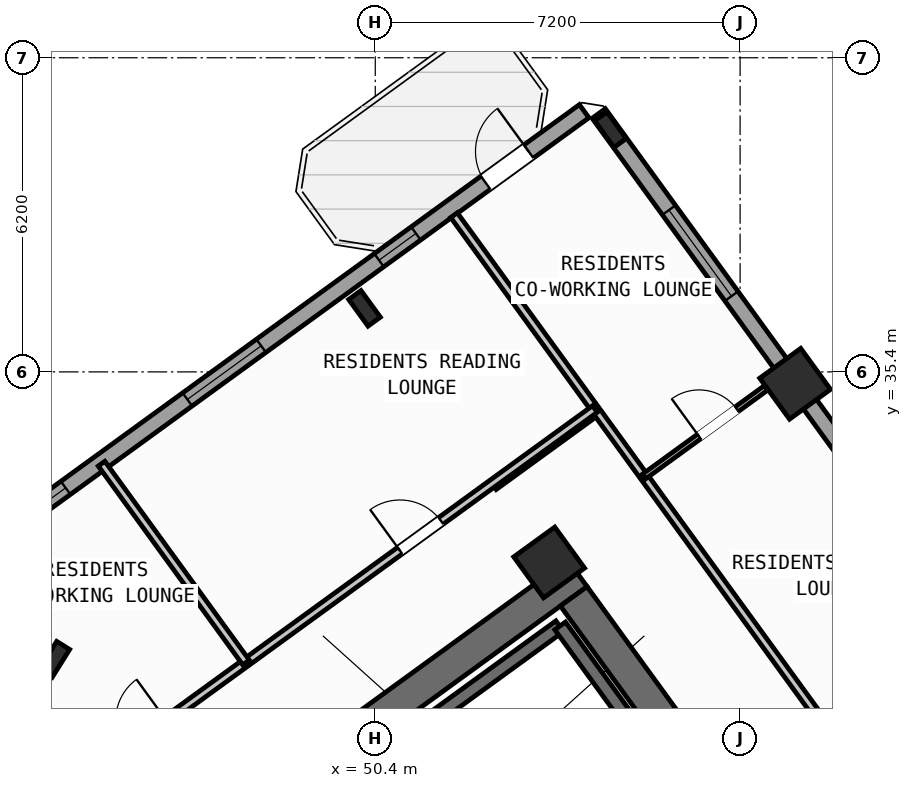
"""IFC4 building model, lengths in metres.
Left out: names, types, materials, properties, quantities, classifications, styles, units other than length and angle.
Written with IfcOpenShell. Run it as: python <this file> out.ifc"""

import sys

from ifc_helpers import new_model, si_unit, direction, frame, frame_2d, origin, origin_2d, place, context, subcontext, project, spatial, rectangle, hollow_rectangle, i_section, extrude, source, transform, mapped, element, fill, save


model = new_model("IFC4")
c1 = context("Model", 3, precision=1e-05, world=origin(), true_north=direction((0.0, 1.0)))
c2 = subcontext(c1, "Body", "Model", "MODEL_VIEW")
j1 = project(units=[si_unit("LENGTHUNIT", "METRE"), si_unit("PLANEANGLEUNIT", "RADIAN")], contexts=[c1])
p1 = place(None, origin())
s1 = spatial("IfcSite", under=j1, at=p1, CompositionType="ELEMENT")
p2 = place(p1, origin())
s2 = spatial("IfcBuilding", under=s1, at=p2, CompositionType="ELEMENT")
p3 = place(p2, frame((0.0, 0.0, 81.0)))
s3 = spatial("IfcBuildingStorey", under=s2, at=p3, CompositionType="ELEMENT", Elevation=81.0)
p4 = place(p3, frame((44.325, 24.113, 0.0), z_axis=(0.0, 0.0, 1.0), x_axis=(0.809012664862, 0.58779121131, 0.0)))
e1 = element("IfcWall", 1, at=p4, inside=s3, PredefinedType="SHEAR", context=c2, shape_type="SweptSolid", body=[
    extrude(rectangle(XDim=12.44, YDim=0.65, at=frame_2d((6.22, 0.0))), origin(), (0.0, 0.0, 1.0), 3.32),
])
p5 = place(p3, frame((58.064, 25.813, 0.0), z_axis=(0.0, 0.0, 1.0), x_axis=(-0.58777996584, 0.809020835181, 0.0)))
e2 = element("IfcWall", 2, at=p5, inside=s3, PredefinedType="SHEAR", context=c2, shape_type="SweptSolid", body=[
    extrude(rectangle(XDim=6.375, YDim=0.65, at=frame_2d((3.188, 0.0))), origin(), (0.0, 0.0, 1.0), 3.32),
])
m1 = source(origin(), c2, "Body", "SweptSolid", [
    extrude(i_section(OverallWidth=0.3, OverallDepth=0.65, WebThickness=0.016, FlangeThickness=0.031, at=origin_2d()), origin(), (0.0, 0.0, 1.0), 3.6),
])
p6 = place(p3, frame((44.068, 29.726, 0.0), z_axis=(0.0, 0.0, 1.0), x_axis=(-0.848048096156, 0.529919264233, 0.0)))
e3 = element("IfcColumn", 3, at=p6, inside=s3, PredefinedType="COLUMN", context=c2, shape_type="MappedRepresentation", body=[
    mapped(m1, transform((0.0, 0.0, 0.0), scale=1.0)),
])
m2 = source(origin(), c2, "Body", "SweptSolid", [
    extrude(hollow_rectangle(XDim=1.0, YDim=1.0, WallThickness=0.04, at=origin_2d()), origin(), (0.0, 0.0, 1.0), 3.6),
])
p7 = place(p3, frame((53.832, 31.638, 0.0), z_axis=(0.0, 0.0, 1.0), x_axis=(0.809016994375, 0.587785252292, 0.0)))
e4 = element("IfcColumn", 4, at=p7, inside=s3, PredefinedType="COLUMN", context=c2, shape_type="MappedRepresentation", body=[
    mapped(m2, transform((0.0, 0.0, 0.0), scale=1.0)),
])
p8 = place(p3, frame((50.188, 36.654, 0.0), z_axis=(0.0, 0.0, 1.0), x_axis=(0.809016994375, 0.587785252292, 0.0)))
e5 = element("IfcColumn", 5, at=p8, inside=s3, PredefinedType="COLUMN", context=c2, shape_type="MappedRepresentation", body=[
    mapped(m1, transform((0.0, 0.0, 0.0), scale=1.0)),
])
p9 = place(p3, frame((58.686, 35.165, 0.0), z_axis=(0.0, 0.0, 1.0), x_axis=(0.809016994375, 0.587785252292, 0.0)))
e6 = element("IfcColumn", 6, at=p9, inside=s3, PredefinedType="COLUMN", context=c2, shape_type="MappedRepresentation", body=[
    mapped(m2, transform((0.0, 0.0, 0.0), scale=1.0)),
])
p10 = place(p3, frame((55.042, 40.181, 0.0), z_axis=(0.0, 0.0, 1.0), x_axis=(0.809016994375, 0.587785252292, 0.0)))
e7 = element("IfcColumn", 7, at=p10, inside=s3, PredefinedType="COLUMN", context=c2, shape_type="MappedRepresentation", body=[
    mapped(m1, transform((0.0, 0.0, 0.0), scale=1.0)),
])
p11 = place(p3, frame((42.207, 31.597, 0.0), z_axis=(0.0, 0.0, 1.0), x_axis=(0.809020333377, 0.587780656523, 0.0)))
e8 = element("IfcWall", 8, at=p11, inside=s3, PredefinedType="STANDARD", context=c2, shape_type="SweptSolid", body=[
    extrude(rectangle(XDim=15.223, YDim=0.32, at=frame_2d((7.611, 0.0))), origin(), (0.0, 0.0, 1.0), 3.32),
])
p12 = place(p11, frame((12.82, 0.0, 0.0)))
e9 = element("IfcOpeningElement", 9, at=p12, cuts=e8, PredefinedType="OPENING", context=c2, shape_type="SweptSolid", body=[
    extrude(rectangle(XDim=1.05, YDim=2.15, at=frame_2d((0.525, 1.075))), frame((0.0, 0.17, 0.0), z_axis=(0.0, -1.0, 0.0), x_axis=(1.0, 0.0, 0.0)), (0.0, 0.0, 1.0), 0.34),
])
p13 = place(p11, frame((0.775, 0.0, 0.85)))
e10 = element("IfcOpeningElement", 10, at=p13, cuts=e8, PredefinedType="OPENING", context=c2, shape_type="SweptSolid", body=[
    extrude(rectangle(XDim=1.8, YDim=1.5, at=frame_2d((0.9, 0.75))), frame((0.0, 0.17, 0.0), z_axis=(0.0, -1.0, 0.0), x_axis=(1.0, 0.0, 0.0)), (0.0, 0.0, 1.0), 0.34),
])
p14 = place(p11, frame((5.544, 0.0, 0.85)))
e11 = element("IfcOpeningElement", 11, at=p14, cuts=e8, PredefinedType="OPENING", context=c2, shape_type="SweptSolid", body=[
    extrude(rectangle(XDim=1.8, YDim=1.5, at=frame_2d((0.9, 0.75))), frame((0.0, 0.17, 0.0), z_axis=(0.0, -1.0, 0.0), x_axis=(1.0, 0.0, 0.0)), (0.0, 0.0, 1.0), 0.34),
])
p15 = place(p11, frame((10.219, 0.0, 1.0)))
e12 = element("IfcOpeningElement", 12, at=p15, cuts=e8, PredefinedType="OPENING", context=c2, shape_type="SweptSolid", body=[
    extrude(rectangle(XDim=0.9, YDim=1.25, at=frame_2d((0.45, 0.625))), frame((0.0, 0.17, 0.0), z_axis=(0.0, -1.0, 0.0), x_axis=(1.0, 0.0, 0.0)), (0.0, 0.0, 1.0), 0.34),
])
p16 = place(p3, frame((54.81, 40.5, 0.0), z_axis=(0.0, 0.0, 1.0), x_axis=(0.587783625747, -0.809018176127, 0.0)))
e13 = element("IfcWall", 13, at=p16, inside=s3, PredefinedType="STANDARD", context=c2, shape_type="SweptSolid", body=[
    extrude(rectangle(XDim=21.587, YDim=0.32, at=frame_2d((10.794, 0.0))), origin(), (0.0, 0.0, 1.0), 2.745),
])
p17 = place(p16, frame((2.356, 0.0, 0.8)))
e14 = element("IfcOpeningElement", 14, at=p17, cuts=e13, PredefinedType="OPENING", context=c2, shape_type="SweptSolid", body=[
    extrude(rectangle(XDim=2.1, YDim=1.55, at=frame_2d((1.05, 0.775))), frame((0.0, 0.17, 0.0), z_axis=(0.0, -1.0, 0.0), x_axis=(1.0, 0.0, 0.0)), (0.0, 0.0, 1.0), 0.34),
])
p18 = place(p16, frame((9.344, 0.0, 0.85)))
e15 = element("IfcOpeningElement", 15, at=p18, cuts=e13, PredefinedType="OPENING", context=c2, shape_type="SweptSolid", body=[
    extrude(rectangle(XDim=1.8, YDim=1.5, at=frame_2d((0.9, 0.75))), frame((0.0, 0.17, 0.0), z_axis=(0.0, -1.0, 0.0), x_axis=(1.0, 0.0, 0.0)), (0.0, 0.0, 1.0), 0.34),
])
p19 = place(p16, frame((19.209, 0.0, 1.0)))
e16 = element("IfcOpeningElement", 16, at=p19, cuts=e13, PredefinedType="OPENING", context=c2, shape_type="SweptSolid", body=[
    extrude(rectangle(XDim=0.9, YDim=1.25, at=frame_2d((0.45, 0.625))), frame((0.0, 0.17, 0.0), z_axis=(0.0, -1.0, 0.0), x_axis=(1.0, 0.0, 0.0)), (0.0, 0.0, 1.0), 0.34),
])
p20 = place(p3, frame((48.006, 25.996, 0.0), z_axis=(0.0, 0.0, 1.0), x_axis=(0.80901903764, 0.587782439969, 0.0)))
e17 = element("IfcWall", 17, at=p20, inside=s3, PredefinedType="SHEAR", context=c2, shape_type="SweptSolid", body=[
    extrude(rectangle(XDim=7.46, YDim=0.26, at=frame_2d((3.73, 0.0))), origin(), (0.0, 0.0, 1.0), 3.32),
])
p21 = place(p3, frame((55.906, 27.831, 0.0), z_axis=(0.0, 0.0, 1.0), x_axis=(-0.587804123638, 0.809003283204, 0.0)))
e18 = element("IfcWall", 18, at=p21, inside=s3, PredefinedType="SHEAR", context=c2, shape_type="SweptSolid", body=[
    extrude(rectangle(XDim=3.16, YDim=0.26, at=frame_2d((1.58, 0.0))), origin(), (0.0, 0.0, 1.0), 3.32),
])
p22 = place(p3, frame((52.739, 33.143, 0.0), z_axis=(0.0, 0.0, 1.0), x_axis=(0.809000999347, 0.58780726693, 0.0)))
e19 = element("IfcWall", 19, at=p22, inside=s3, PredefinedType="PARTITIONING", context=c2, shape_type="SweptSolid", body=[
    extrude(rectangle(XDim=2.51, YDim=0.16, at=frame_2d((1.255, 0.0))), origin(), (0.0, 0.0, 1.0), 3.31),
])
p23 = place(p3, frame((61.564, 25.266, 0.0), z_axis=(0.0, 0.0, 1.0), x_axis=(-0.587784527444, 0.809017521007, 0.0)))
e20 = element("IfcWall", 20, at=p23, inside=s3, PredefinedType="PARTITIONING", context=c2, shape_type="SweptSolid", body=[
    extrude(rectangle(XDim=16.35, YDim=0.16, at=frame_2d((8.175, 0.0))), origin(), (0.0, 0.0, 1.0), 3.31),
])
p24 = place(p3, frame((55.703, 33.334, 0.0), z_axis=(0.0, 0.0, 1.0), x_axis=(0.809065651839, 0.587718275209, 0.0)))
e21 = element("IfcWall", 21, at=p24, inside=s3, PredefinedType="PARTITIONING", context=c2, shape_type="SweptSolid", body=[
    extrude(rectangle(XDim=2.978, YDim=0.11, at=frame_2d((1.489, 0.0))), origin(), (0.0, 0.0, 1.0), 2.745),
])
p25 = place(p24, frame((1.345, 0.0, 0.0)))
e22 = element("IfcOpeningElement", 22, at=p25, cuts=e21, PredefinedType="OPENING", context=c2, shape_type="SweptSolid", body=[
    extrude(rectangle(XDim=0.92, YDim=2.08, at=frame_2d((0.46, 1.04))), frame((0.0, 0.065, 0.0), z_axis=(0.0, -1.0, 0.0), x_axis=(1.0, 0.0, 0.0)), (0.0, 0.0, 1.0), 0.13),
])
p26 = place(p3, frame((42.866, 26.044, 0.0), z_axis=(0.0, 0.0, 1.0), x_axis=(0.809020254154, 0.587780765566, 0.0)))
e23 = element("IfcWall", 23, at=p26, inside=s3, PredefinedType="PARTITIONING", context=c2, shape_type="SweptSolid", body=[
    extrude(rectangle(XDim=14.67, YDim=0.16, at=frame_2d((7.335, 0.0))), origin(), (0.0, 0.0, 1.0), 3.31),
])
p27 = place(p26, frame((3.215, 0.0, 0.0)))
e24 = element("IfcOpeningElement", 24, at=p27, cuts=e23, PredefinedType="OPENING", context=c2, shape_type="SweptSolid", body=[
    extrude(rectangle(XDim=1.0, YDim=2.1, at=frame_2d((0.5, 1.05))), frame((0.0, 0.09, 0.0), z_axis=(0.0, -1.0, 0.0), x_axis=(1.0, 0.0, 0.0)), (0.0, 0.0, 1.0), 0.18),
])
p28 = place(p26, frame((9.915, 0.0, 0.0)))
e25 = element("IfcOpeningElement", 25, at=p28, cuts=e23, PredefinedType="OPENING", context=c2, shape_type="SweptSolid", body=[
    extrude(rectangle(XDim=1.0, YDim=2.1, at=frame_2d((0.5, 1.05))), frame((0.0, 0.09, 0.0), z_axis=(0.0, -1.0, 0.0), x_axis=(1.0, 0.0, 0.0)), (0.0, 0.0, 1.0), 0.18),
])
p29 = place(p3, frame((43.969, 26.55, 0.0), z_axis=(0.0, 0.0, 1.0), x_axis=(-0.587776919386, 0.80902304852, 0.0)))
e26 = element("IfcWall", 26, at=p29, inside=s3, PredefinedType="PARTITIONING", context=c2, shape_type="SweptSolid", body=[
    extrude(rectangle(XDim=5.48, YDim=0.16, at=frame_2d((2.74, 0.0))), origin(), (0.0, 0.0, 1.0), 3.31),
])
p30 = place(p3, frame((47.849, 29.665, 0.0), z_axis=(0.0, 0.0, 1.0), x_axis=(-0.587785532001, 0.809016791155, 0.0)))
e27 = element("IfcWall", 27, at=p30, inside=s3, PredefinedType="PARTITIONING", context=c2, shape_type="SweptSolid", body=[
    extrude(rectangle(XDim=4.85, YDim=0.16, at=frame_2d((2.425, 0.0))), origin(), (0.0, 0.0, 1.0), 3.31),
])
m3 = source(origin(), c2, "Body", "SweptSolid", [
    extrude(rectangle(XDim=1.05, YDim=2.15, at=frame_2d((0.525, 1.075))), frame((0.0, 0.025, 0.0), z_axis=(0.0, -1.0, 0.0), x_axis=(1.0, 0.0, 0.0)), (0.0, 0.0, 1.0), 0.05),
])
p31 = place(p12, origin())
e28 = element("IfcDoor", 28, at=p31, inside=s3, OperationType="SINGLE_SWING_RIGHT", PredefinedType="DOOR", context=c2, shape_type="MappedRepresentation", body=[
    mapped(m3, transform((0.0, 0.0, 0.0), scale=1.0)),
])
fill(e9, e28)
m4 = source(origin(), c2, "Body", "SweptSolid", [
    extrude(rectangle(XDim=1.8, YDim=1.5, at=frame_2d((0.9, 0.75))), frame((0.0, 0.03, 0.0), z_axis=(0.0, -1.0, 0.0), x_axis=(1.0, 0.0, 0.0)), (0.0, 0.0, 1.0), 0.06),
])
p32 = place(p13, origin())
e29 = element("IfcWindow", 29, at=p32, inside=s3, PartitioningType="SINGLE_PANEL", PredefinedType="WINDOW", context=c2, shape_type="MappedRepresentation", body=[
    mapped(m4, transform((0.0, 0.0, 0.0), scale=1.0)),
])
fill(e10, e29)
p33 = place(p14, origin())
e30 = element("IfcWindow", 30, at=p33, inside=s3, PartitioningType="SINGLE_PANEL", PredefinedType="WINDOW", context=c2, shape_type="MappedRepresentation", body=[
    mapped(m4, transform((0.0, 0.0, 0.0), scale=1.0)),
])
fill(e11, e30)
m5 = source(origin(), c2, "Body", "SweptSolid", [
    extrude(rectangle(XDim=0.9, YDim=1.25, at=frame_2d((0.45, 0.625))), frame((0.0, 0.03, 0.0), z_axis=(0.0, -1.0, 0.0), x_axis=(1.0, 0.0, 0.0)), (0.0, 0.0, 1.0), 0.06),
])
p34 = place(p15, origin())
e31 = element("IfcWindow", 31, at=p34, inside=s3, PartitioningType="SINGLE_PANEL", PredefinedType="WINDOW", context=c2, shape_type="MappedRepresentation", body=[
    mapped(m5, transform((0.0, 0.0, 0.0), scale=1.0)),
])
fill(e12, e31)
m6 = source(origin(), c2, "Body", "SweptSolid", [
    extrude(rectangle(XDim=2.1, YDim=1.55, at=frame_2d((1.05, 0.775))), frame((0.0, 0.03, 0.0), z_axis=(0.0, -1.0, 0.0), x_axis=(1.0, 0.0, 0.0)), (0.0, 0.0, 1.0), 0.06),
])
p35 = place(p17, origin())
e32 = element("IfcWindow", 32, at=p35, inside=s3, PartitioningType="SINGLE_PANEL", PredefinedType="WINDOW", context=c2, shape_type="MappedRepresentation", body=[
    mapped(m6, transform((0.0, 0.0, 0.0), scale=1.0)),
])
fill(e14, e32)
m7 = source(origin(), c2, "Body", "SweptSolid", [
    extrude(rectangle(XDim=0.92, YDim=2.08, at=frame_2d((0.46, 1.04))), frame((0.0, 0.025, 0.0), z_axis=(0.0, -1.0, 0.0), x_axis=(1.0, 0.0, 0.0)), (0.0, 0.0, 1.0), 0.05),
])
p36 = place(p25, origin())
e33 = element("IfcDoor", 33, at=p36, inside=s3, OperationType="SINGLE_SWING_LEFT", PredefinedType="DOOR", context=c2, shape_type="MappedRepresentation", body=[
    mapped(m7, transform((0.0, 0.0, 0.0), scale=1.0)),
])
fill(e22, e33)
m8 = source(origin(), c2, "Body", "SweptSolid", [
    extrude(rectangle(XDim=1.0, YDim=2.1, at=frame_2d((0.5, 1.05))), frame((0.0, 0.025, 0.0), z_axis=(0.0, -1.0, 0.0), x_axis=(1.0, 0.0, 0.0)), (0.0, 0.0, 1.0), 0.05),
])
p37 = place(p28, origin())
e34 = element("IfcDoor", 34, at=p37, inside=s3, OperationType="SINGLE_SWING_LEFT", PredefinedType="DOOR", context=c2, shape_type="MappedRepresentation", body=[
    mapped(m8, transform((0.0, 0.0, 0.0), scale=1.0)),
])
fill(e25, e34)
save(model, sys.argv[1])
